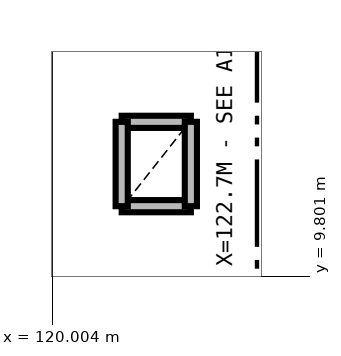
"""IFC4 building model, lengths in metres.
Left out: names, types, materials, properties, quantities, classifications, styles, units other than length and angle.
Written with IfcOpenShell. Run it as: python <this file> out.ifc"""

import sys

from ifc_helpers import new_model, si_unit, direction, frame, frame_2d, origin, place, context, subcontext, project, spatial, rectangle, extrude, element, save


model = new_model("IFC4")
c1 = context("Model", 3, precision=1e-05, world=origin(), true_north=direction((0.0, 1.0)))
c2 = subcontext(c1, "Body", "Model", "MODEL_VIEW")
j1 = project(units=[si_unit("LENGTHUNIT", "METRE"), si_unit("PLANEANGLEUNIT", "RADIAN")], contexts=[c1])
p1 = place(None, origin())
s1 = spatial("IfcSite", under=j1, at=p1, CompositionType="ELEMENT")
p2 = place(p1, origin())
s2 = spatial("IfcBuilding", under=s1, at=p2, CompositionType="ELEMENT")
p3 = place(p2, frame((0.0, 0.0, 5.1)))
s3 = spatial("IfcBuildingStorey", under=s2, at=p3, CompositionType="ELEMENT", Elevation=5.1)
for number, where, z_axis, x_axis in (
    (1, (120.92, 10.72, 0.0), (0.0, 0.0, 1.0), (1.0, 0.0, 0.0)),
    (2, (121.83, 11.83, 0.0), (0.0, 0.0, 1.0), (-1.0, 0.0, 0.0)),
):
    element("IfcWall", number, at=place(p3, frame(where, z_axis=z_axis, x_axis=x_axis)), inside=s3, PredefinedType="PARTITIONING", context=c2, shape_type="SweptSolid", body=[
        extrude(rectangle(XDim=0.91, YDim=0.16, at=frame_2d((0.455, 0.0))), origin(), (0.0, 0.0, 1.0), 3.455),
    ])
p4 = place(p3, frame((120.92, 11.83, 0.0), z_axis=(0.0, 0.0, 1.0), x_axis=(0.0, -1.0, 0.0)))
e3 = element("IfcWall", 3, at=p4, inside=s3, PredefinedType="PARTITIONING", context=c2, shape_type="SweptSolid", body=[
    extrude(rectangle(XDim=1.11, YDim=0.16, at=frame_2d((0.555, 0.0))), origin(), (0.0, 0.0, 1.0), 3.65),
])
p5 = place(p3, frame((121.83, 10.72, 0.0), z_axis=(0.0, 0.0, 1.0), x_axis=(0.0, 1.0, 0.0)))
e4 = element("IfcWall", 4, at=p5, inside=s3, PredefinedType="PARTITIONING", context=c2, shape_type="SweptSolid", body=[
    extrude(rectangle(XDim=1.11, YDim=0.16, at=frame_2d((0.555, 0.0))), origin(), (0.0, 0.0, 1.0), 3.455),
])
save(model, sys.argv[1])
